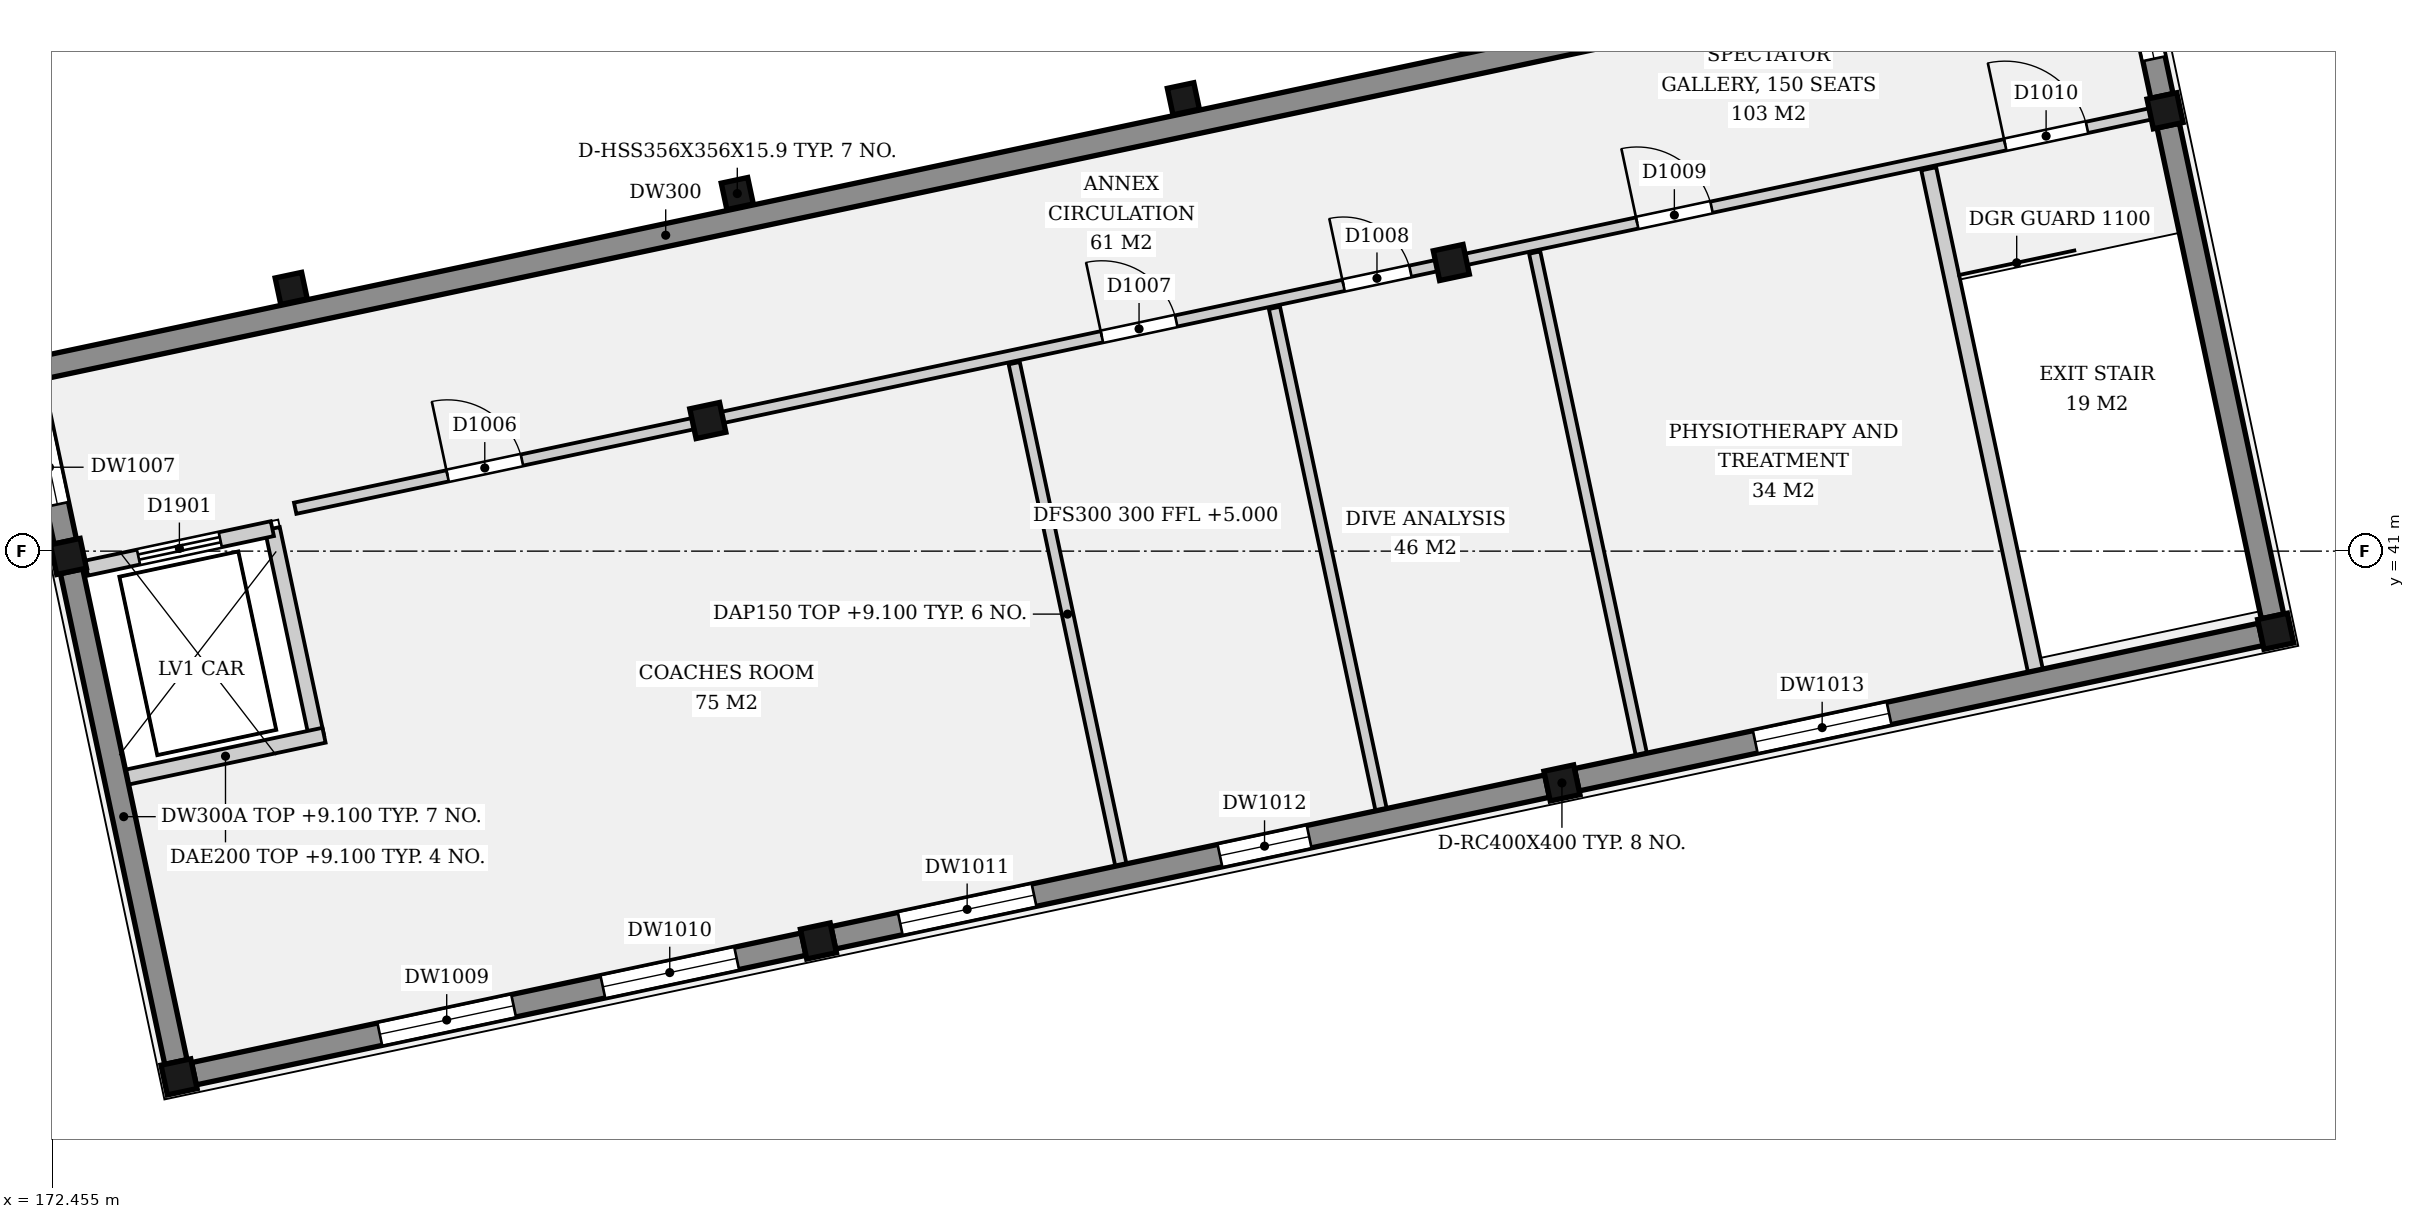
"""IFC4 building model, lengths in metres.
Left out: names, types, materials, properties, quantities, classifications, styles, units other than length and angle.
Written with IfcOpenShell. Run it as: python <this file> out.ifc"""

import sys

from ifc_helpers import new_model, si_unit, direction, frame, frame_2d, origin, origin_2d, place, context, subcontext, project, spatial, rectangle, hollow_rectangle, extrude, element, fill, save


model = new_model("IFC4")
c1 = context("Model", 3, precision=1e-05, world=origin(), true_north=direction((0.0, 1.0)))
c2 = subcontext(c1, "Body", "Model", "MODEL_VIEW")
j1 = project(units=[si_unit("LENGTHUNIT", "METRE"), si_unit("PLANEANGLEUNIT", "RADIAN")], contexts=[c1])
p1 = place(None, origin())
s1 = spatial("IfcSite", under=j1, at=p1, CompositionType="ELEMENT")
p2 = place(p1, origin())
s2 = spatial("IfcBuilding", under=s1, at=p2, CompositionType="ELEMENT")
p3 = place(p2, frame((0.0, 0.0, 5.0)))
s3 = spatial("IfcBuildingStorey", under=s2, at=p3, CompositionType="ELEMENT", Elevation=5.0)
for number, where, z_axis, x_axis in (
    (1, (174.119, 34.083, 0.0), (0.0, 0.0, 1.0), (0.978, 0.208, 0.0)),
    (2, (172.664, 40.93, 0.0), (0.0, 0.0, 1.0), (0.978, 0.208, 0.0)),
    (3, (182.531, 35.871, 0.0), (0.0, 0.0, 1.0), (0.978, 0.208, 0.0)),
    (4, (181.076, 42.718, 0.0), (0.0, 0.0, 1.0), (0.978, 0.208, 0.0)),
    (5, (192.313, 37.95, 0.0), (0.0, 0.0, 1.0), (0.978, 0.208, 0.0)),
    (6, (190.858, 44.797, 0.0), (0.0, 0.0, 1.0), (0.978, 0.208, 0.0)),
    (7, (201.703, 39.946, 0.0), (0.0, 0.0, 1.0), (0.978, 0.208, 0.0)),
    (8, (200.248, 46.793, 0.0), (0.0, 0.0, 1.0), (0.978, 0.208, 0.0)),
):
    element("IfcColumn", number, at=place(p3, frame(where, z_axis=z_axis, x_axis=x_axis)), inside=s3, PredefinedType="COLUMN", context=c2, shape_type="SweptSolid", body=[
        extrude(rectangle(XDim=0.4, YDim=0.4, at=origin_2d()), origin(), (0.0, 0.0, 1.0), 4.4),
    ])
for number, where, z_axis, x_axis in (
    (9, (175.595, 44.457, 0.0), (0.0, 0.0, 1.0), (0.978, 0.208, 0.0)),
    (10, (181.464, 45.704, 0.0), (0.0, 0.0, 1.0), (0.978, 0.208, 0.0)),
    (11, (187.333, 46.951, 0.0), (0.0, 0.0, 1.0), (0.978, 0.208, 0.0)),
):
    element("IfcColumn", number, at=place(p3, frame(where, z_axis=z_axis, x_axis=x_axis)), inside=s3, PredefinedType="COLUMN", context=c2, shape_type="SweptSolid", body=[
        extrude(hollow_rectangle(XDim=0.356, YDim=0.356, WallThickness=0.016, InnerFilletRadius=0.008, OuterFilletRadius=0.024, at=origin_2d()), origin(), (0.0, 0.0, 1.0), 4.4),
    ])
p4 = place(p3, frame((163.439, 41.525, 0.0), z_axis=(0.0, 0.0, 1.0), x_axis=(0.978148061555, 0.207909522815, 0.0)))
e12 = element("IfcWall", 12, at=p4, inside=s3, PredefinedType="SOLIDWALL", context=c2, shape_type="SweptSolid", body=[
    extrude(rectangle(XDim=37.5, YDim=0.3, at=frame_2d((18.75, 0.0))), origin(), (0.0, 0.0, 1.0), 4.4),
])
p5 = place(p4, frame((35.2, 0.0, 0.0)))
e13 = element("IfcOpeningElement", 13, at=p5, cuts=e12, PredefinedType="OPENING", context=c2, shape_type="SweptSolid", body=[
    extrude(rectangle(XDim=1.2, YDim=2.1, at=frame_2d((0.6, 1.05))), frame((0.0, 0.16, 0.0), z_axis=(0.0, -1.0, 0.0), x_axis=(1.0, 0.0, 0.0)), (0.0, 0.0, 1.0), 0.32),
])
p6 = place(p3, frame((174.315, 34.125, 0.0), z_axis=(0.0, 0.0, 1.0), x_axis=(0.978148331689, 0.207908251916, 0.0)))
e14 = element("IfcWall", 14, at=p6, inside=s3, PredefinedType="ELEMENTEDWALL", context=c2, shape_type="SweptSolid", body=[
    extrude(rectangle(XDim=8.2, YDim=0.3, at=frame_2d((4.1, 0.0))), origin(), (0.0, 0.0, 1.0), 4.1),
])
p7 = place(p6, frame((2.5, 0.0, 1.0)))
e15 = element("IfcOpeningElement", 15, at=p7, cuts=e14, PredefinedType="OPENING", context=c2, shape_type="SweptSolid", body=[
    extrude(rectangle(XDim=1.8, YDim=1.2, at=frame_2d((0.9, 0.6))), frame((0.0, 0.16, 0.0), z_axis=(0.0, -1.0, 0.0), x_axis=(1.0, 0.0, 0.0)), (0.0, 0.0, 1.0), 0.32),
])
p8 = place(p6, frame((5.5, 0.0, 1.0)))
e16 = element("IfcOpeningElement", 16, at=p8, cuts=e14, PredefinedType="OPENING", context=c2, shape_type="SweptSolid", body=[
    extrude(rectangle(XDim=1.8, YDim=1.2, at=frame_2d((0.9, 0.6))), frame((0.0, 0.16, 0.0), z_axis=(0.0, -1.0, 0.0), x_axis=(1.0, 0.0, 0.0)), (0.0, 0.0, 1.0), 0.32),
])
p9 = place(p3, frame((182.727, 35.913, 0.0), z_axis=(0.0, 0.0, 1.0), x_axis=(0.978150512552, 0.207897991319, 0.0)))
e17 = element("IfcWall", 17, at=p9, inside=s3, PredefinedType="ELEMENTEDWALL", context=c2, shape_type="SweptSolid", body=[
    extrude(rectangle(XDim=9.6, YDim=0.3, at=frame_2d((4.8, 0.0))), origin(), (0.0, 0.0, 1.0), 4.1),
])
p10 = place(p9, frame((0.9, 0.0, 1.0)))
e18 = element("IfcOpeningElement", 18, at=p10, cuts=e17, PredefinedType="OPENING", context=c2, shape_type="SweptSolid", body=[
    extrude(rectangle(XDim=1.8, YDim=1.2, at=frame_2d((0.9, 0.6))), frame((0.0, 0.16, 0.0), z_axis=(0.0, -1.0, 0.0), x_axis=(1.0, 0.0, 0.0)), (0.0, 0.0, 1.0), 0.32),
])
p11 = place(p9, frame((5.2, 0.0, 1.4)))
e19 = element("IfcOpeningElement", 19, at=p11, cuts=e17, PredefinedType="OPENING", context=c2, shape_type="SweptSolid", body=[
    extrude(rectangle(XDim=1.2, YDim=1.2, at=frame_2d((0.6, 0.6))), frame((0.0, 0.16, 0.0), z_axis=(0.0, -1.0, 0.0), x_axis=(1.0, 0.0, 0.0)), (0.0, 0.0, 1.0), 0.32),
])
p12 = place(p3, frame((192.509, 37.992, 0.0), z_axis=(0.0, 0.0, 1.0), x_axis=(0.978146709523, 0.20791588359, 0.0)))
e20 = element("IfcWall", 20, at=p12, inside=s3, PredefinedType="ELEMENTEDWALL", context=c2, shape_type="SweptSolid", body=[
    extrude(rectangle(XDim=9.2, YDim=0.3, at=frame_2d((4.6, 0.0))), origin(), (0.0, 0.0, 1.0), 4.1),
])
p13 = place(p12, frame((2.4, 0.0, 1.0)))
e21 = element("IfcOpeningElement", 21, at=p13, cuts=e20, PredefinedType="OPENING", context=c2, shape_type="SweptSolid", body=[
    extrude(rectangle(XDim=1.8, YDim=1.2, at=frame_2d((0.9, 0.6))), frame((0.0, 0.16, 0.0), z_axis=(0.0, -1.0, 0.0), x_axis=(1.0, 0.0, 0.0)), (0.0, 0.0, 1.0), 0.32),
])
for number, where, z_axis, x_axis in (
    (22, (174.078, 34.279, 0.0), (0.0, 0.0, 1.0), (-0.208, 0.978, 0.0)),
    (23, (201.662, 40.142, 0.0), (0.0, 0.0, 1.0), (-0.208, 0.978, 0.0)),
):
    element("IfcWall", number, at=place(p3, frame(where, z_axis=z_axis, x_axis=x_axis)), inside=s3, PredefinedType="ELEMENTEDWALL", context=c2, shape_type="SweptSolid", body=[
        extrude(rectangle(XDim=6.6, YDim=0.3, at=frame_2d((3.3, 0.0))), origin(), (0.0, 0.0, 1.0), 4.1),
    ])
p14 = place(p3, frame((172.623, 41.126, 0.0), z_axis=(0.0, 0.0, 1.0), x_axis=(-0.207915795165, 0.978146728319, 0.0)))
e24 = element("IfcWall", 24, at=p14, inside=s3, PredefinedType="ELEMENTEDWALL", context=c2, shape_type="SweptSolid", body=[
    extrude(rectangle(XDim=2.15, YDim=0.3, at=frame_2d((1.075, 0.0))), origin(), (0.0, 0.0, 1.0), 4.1),
])
p15 = place(p14, frame((0.5, 0.0, 1.0)))
e25 = element("IfcOpeningElement", 25, at=p15, cuts=e24, PredefinedType="OPENING", context=c2, shape_type="SweptSolid", body=[
    extrude(rectangle(XDim=1.0, YDim=1.2, at=frame_2d((0.5, 0.6))), frame((0.0, 0.16, 0.0), z_axis=(0.0, -1.0, 0.0), x_axis=(1.0, 0.0, 0.0)), (0.0, 0.0, 1.0), 0.32),
])
p16 = place(p3, frame((200.206, 46.989, 0.0), z_axis=(0.0, 0.0, 1.0), x_axis=(-0.207938891219, 0.978141818715, 0.0)))
e26 = element("IfcWall", 26, at=p16, inside=s3, PredefinedType="ELEMENTEDWALL", context=c2, shape_type="SweptSolid", body=[
    extrude(rectangle(XDim=2.15, YDim=0.3, at=frame_2d((1.075, 0.0))), origin(), (0.0, 0.0, 1.0), 4.1),
])
p17 = place(p16, frame((0.5, 0.0, 1.0)))
e27 = element("IfcOpeningElement", 27, at=p17, cuts=e26, PredefinedType="OPENING", context=c2, shape_type="SweptSolid", body=[
    extrude(rectangle(XDim=1.0, YDim=1.2, at=frame_2d((0.5, 0.6))), frame((0.0, 0.16, 0.0), z_axis=(0.0, -1.0, 0.0), x_axis=(1.0, 0.0, 0.0)), (0.0, 0.0, 1.0), 0.32),
])
p18 = place(p3, frame((175.647, 41.564, 0.0), z_axis=(0.0, 0.0, 1.0), x_axis=(0.978148991832, 0.207905146106, 0.0)))
e28 = element("IfcWall", 28, at=p18, inside=s3, PredefinedType="PARTITIONING", context=c2, shape_type="SweptSolid", body=[
    extrude(rectangle(XDim=5.35, YDim=0.15, at=frame_2d((2.675, 0.0))), origin(), (0.0, 0.0, 1.0), 4.1),
])
p19 = place(p18, frame((2.05, 0.0, 0.0)))
e29 = element("IfcOpeningElement", 29, at=p19, cuts=e28, PredefinedType="OPENING", context=c2, shape_type="SweptSolid", body=[
    extrude(rectangle(XDim=1.0, YDim=2.1, at=frame_2d((0.5, 1.05))), frame((0.0, 0.085, 0.0), z_axis=(0.0, -1.0, 0.0), x_axis=(1.0, 0.0, 0.0)), (0.0, 0.0, 1.0), 0.17),
])
p20 = place(p3, frame((181.272, 42.76, 0.0), z_axis=(0.0, 0.0, 1.0), x_axis=(0.978150512552, 0.207897991319, 0.0)))
e30 = element("IfcWall", 30, at=p20, inside=s3, PredefinedType="PARTITIONING", context=c2, shape_type="SweptSolid", body=[
    extrude(rectangle(XDim=9.6, YDim=0.15, at=frame_2d((4.8, 0.0))), origin(), (0.0, 0.0, 1.0), 4.1),
])
p21 = place(p20, frame((5.1, 0.0, 0.0)))
e31 = element("IfcOpeningElement", 31, at=p21, cuts=e30, PredefinedType="OPENING", context=c2, shape_type="SweptSolid", body=[
    extrude(rectangle(XDim=1.0, YDim=2.1, at=frame_2d((0.5, 1.05))), frame((0.0, 0.085, 0.0), z_axis=(0.0, -1.0, 0.0), x_axis=(1.0, 0.0, 0.0)), (0.0, 0.0, 1.0), 0.17),
])
p22 = place(p20, frame((8.35, 0.0, 0.0)))
e32 = element("IfcOpeningElement", 32, at=p22, cuts=e30, PredefinedType="OPENING", context=c2, shape_type="SweptSolid", body=[
    extrude(rectangle(XDim=0.9, YDim=2.1, at=frame_2d((0.45, 1.05))), frame((0.0, 0.085, 0.0), z_axis=(0.0, -1.0, 0.0), x_axis=(1.0, 0.0, 0.0)), (0.0, 0.0, 1.0), 0.17),
])
p23 = place(p3, frame((191.053, 44.839, 0.0), z_axis=(0.0, 0.0, 1.0), x_axis=(0.978146709523, 0.20791588359, 0.0)))
e33 = element("IfcWall", 33, at=p23, inside=s3, PredefinedType="PARTITIONING", context=c2, shape_type="SweptSolid", body=[
    extrude(rectangle(XDim=9.2, YDim=0.15, at=frame_2d((4.6, 0.0))), origin(), (0.0, 0.0, 1.0), 4.1),
])
p24 = place(p23, frame((2.3, 0.0, 0.0)))
e34 = element("IfcOpeningElement", 34, at=p24, cuts=e33, PredefinedType="OPENING", context=c2, shape_type="SweptSolid", body=[
    extrude(rectangle(XDim=1.0, YDim=2.1, at=frame_2d((0.5, 1.05))), frame((0.0, 0.085, 0.0), z_axis=(0.0, -1.0, 0.0), x_axis=(1.0, 0.0, 0.0)), (0.0, 0.0, 1.0), 0.17),
])
p25 = place(p23, frame((7.25, 0.0, 0.0)))
e35 = element("IfcOpeningElement", 35, at=p25, cuts=e33, PredefinedType="OPENING", context=c2, shape_type="SweptSolid", body=[
    extrude(rectangle(XDim=1.1, YDim=2.1, at=frame_2d((0.55, 1.05))), frame((0.0, 0.085, 0.0), z_axis=(0.0, -1.0, 0.0), x_axis=(1.0, 0.0, 0.0)), (0.0, 0.0, 1.0), 0.17),
])
for number, where, z_axis, x_axis in (
    (36, (186.511, 36.87, 0.0), (0.0, 0.0, 1.0), (-0.208, 0.978, 0.0)),
    (37, (189.934, 37.598, 0.0), (0.0, 0.0, 1.0), (-0.208, 0.978, 0.0)),
    (38, (193.358, 38.326, 0.0), (0.0, 0.0, 1.0), (-0.208, 0.978, 0.0)),
):
    element("IfcWall", number, at=place(p3, frame(where, z_axis=z_axis, x_axis=x_axis)), inside=s3, PredefinedType="PARTITIONING", context=c2, shape_type="SweptSolid", body=[
        extrude(rectangle(XDim=6.75, YDim=0.15, at=frame_2d((3.375, 0.0))), origin(), (0.0, 0.0, 1.0), 4.1),
    ])
p26 = place(p3, frame((172.901, 40.776, 0.0), z_axis=(0.0, 0.0, 1.0), x_axis=(0.978146935828, 0.207914818928, 0.0)))
e39 = element("IfcWall", 39, at=p26, inside=s3, PredefinedType="SOLIDWALL", context=c2, shape_type="SweptSolid", body=[
    extrude(rectangle(XDim=2.5, YDim=0.2, at=frame_2d((1.25, 0.0))), origin(), (0.0, 0.0, 1.0), 4.1),
])
p27 = place(p26, frame((0.7, 0.0, 0.0)))
e40 = element("IfcOpeningElement", 40, at=p27, cuts=e39, PredefinedType="OPENING", context=c2, shape_type="SweptSolid", body=[
    extrude(rectangle(XDim=1.1, YDim=2.1, at=frame_2d((0.55, 1.05))), frame((0.0, 0.11, 0.0), z_axis=(0.0, -1.0, 0.0), x_axis=(1.0, 0.0, 0.0)), (0.0, 0.0, 1.0), 0.22),
])
p28 = place(p3, frame((175.929, 38.557, 0.0), z_axis=(0.0, 0.0, 1.0), x_axis=(-0.207873355681, 0.978155748334, 0.0)))
e41 = element("IfcWall", 41, at=p28, inside=s3, PredefinedType="SOLIDWALL", context=c2, shape_type="SweptSolid", body=[
    extrude(rectangle(XDim=2.8, YDim=0.2, at=frame_2d((1.4, 0.0))), origin(), (0.0, 0.0, 1.0), 4.1),
])
p29 = place(p3, frame((173.435, 38.027, 0.0), z_axis=(0.0, 0.0, 1.0), x_axis=(0.978142223379, 0.207936987677, 0.0)))
e42 = element("IfcWall", 42, at=p29, inside=s3, PredefinedType="SOLIDWALL", context=c2, shape_type="SweptSolid", body=[
    extrude(rectangle(XDim=2.65, YDim=0.2, at=frame_2d((1.325, 0.0))), origin(), (0.0, 0.0, 1.0), 4.1),
])
p30 = place(p3, frame((198.542, 39.428, 0.0), z_axis=(0.0, 0.0, 1.0), x_axis=(-0.207940514438, 0.97814147364, 0.0)))
e43 = element("IfcWall", 43, at=p30, inside=s3, PredefinedType="SOLIDWALL", context=c2, shape_type="SweptSolid", body=[
    extrude(rectangle(XDim=6.75, YDim=0.2, at=frame_2d((3.375, 0.0))), origin(), (0.0, 0.0, 1.0), 4.1),
])
p31 = place(p27, origin())
e44 = element("IfcDoor", 44, at=p31, inside=s3, OperationType="SLIDING_TO_LEFT", PredefinedType="DOOR", context=c2, shape_type="SweptSolid", body=[
    extrude(rectangle(XDim=1.1, YDim=2.1, at=frame_2d((0.55, 1.05))), frame((0.0, 0.025, 0.0), z_axis=(0.0, -1.0, 0.0), x_axis=(1.0, 0.0, 0.0)), (0.0, 0.0, 1.0), 0.05),
])
fill(e40, e44)
p32 = place(p19, origin())
e45 = element("IfcDoor", 45, at=p32, inside=s3, OperationType="SINGLE_SWING_LEFT", PredefinedType="DOOR", context=c2, shape_type="SweptSolid", body=[
    extrude(rectangle(XDim=1.0, YDim=2.1, at=frame_2d((0.5, 1.05))), frame((0.0, 0.025, 0.0), z_axis=(0.0, -1.0, 0.0), x_axis=(1.0, 0.0, 0.0)), (0.0, 0.0, 1.0), 0.05),
])
fill(e29, e45)
p33 = place(p21, origin())
e46 = element("IfcDoor", 46, at=p33, inside=s3, OperationType="SINGLE_SWING_LEFT", PredefinedType="DOOR", context=c2, shape_type="SweptSolid", body=[
    extrude(rectangle(XDim=1.0, YDim=2.1, at=frame_2d((0.5, 1.05))), frame((0.0, 0.025, 0.0), z_axis=(0.0, -1.0, 0.0), x_axis=(1.0, 0.0, 0.0)), (0.0, 0.0, 1.0), 0.05),
])
fill(e31, e46)
p34 = place(p22, origin())
e47 = element("IfcDoor", 47, at=p34, inside=s3, OperationType="SINGLE_SWING_LEFT", PredefinedType="DOOR", context=c2, shape_type="SweptSolid", body=[
    extrude(rectangle(XDim=0.9, YDim=2.1, at=frame_2d((0.45, 1.05))), frame((0.0, 0.025, 0.0), z_axis=(0.0, -1.0, 0.0), x_axis=(1.0, 0.0, 0.0)), (0.0, 0.0, 1.0), 0.05),
])
fill(e32, e47)
p35 = place(p24, origin())
e48 = element("IfcDoor", 48, at=p35, inside=s3, OperationType="SINGLE_SWING_LEFT", PredefinedType="DOOR", context=c2, shape_type="SweptSolid", body=[
    extrude(rectangle(XDim=1.0, YDim=2.1, at=frame_2d((0.5, 1.05))), frame((0.0, 0.025, 0.0), z_axis=(0.0, -1.0, 0.0), x_axis=(1.0, 0.0, 0.0)), (0.0, 0.0, 1.0), 0.05),
])
fill(e34, e48)
p36 = place(p25, origin())
e49 = element("IfcDoor", 49, at=p36, inside=s3, OperationType="SINGLE_SWING_LEFT", PredefinedType="DOOR", context=c2, shape_type="SweptSolid", body=[
    extrude(rectangle(XDim=1.1, YDim=2.1, at=frame_2d((0.55, 1.05))), frame((0.0, 0.025, 0.0), z_axis=(0.0, -1.0, 0.0), x_axis=(1.0, 0.0, 0.0)), (0.0, 0.0, 1.0), 0.05),
])
fill(e35, e49)
p37 = place(p15, origin())
e50 = element("IfcWindow", 50, at=p37, inside=s3, PartitioningType="SINGLE_PANEL", PredefinedType="WINDOW", context=c2, shape_type="SweptSolid", body=[
    extrude(rectangle(XDim=1.0, YDim=1.2, at=frame_2d((0.5, 0.6))), frame((0.0, 0.03, 0.0), z_axis=(0.0, -1.0, 0.0), x_axis=(1.0, 0.0, 0.0)), (0.0, 0.0, 1.0), 0.06),
])
fill(e25, e50)
p38 = place(p17, origin())
e51 = element("IfcWindow", 51, at=p38, inside=s3, PartitioningType="SINGLE_PANEL", PredefinedType="WINDOW", context=c2, shape_type="SweptSolid", body=[
    extrude(rectangle(XDim=1.0, YDim=1.2, at=frame_2d((0.5, 0.6))), frame((0.0, 0.03, 0.0), z_axis=(0.0, -1.0, 0.0), x_axis=(1.0, 0.0, 0.0)), (0.0, 0.0, 1.0), 0.06),
])
fill(e27, e51)
p39 = place(p7, origin())
e52 = element("IfcWindow", 52, at=p39, inside=s3, PartitioningType="SINGLE_PANEL", PredefinedType="WINDOW", context=c2, shape_type="SweptSolid", body=[
    extrude(rectangle(XDim=1.8, YDim=1.2, at=frame_2d((0.9, 0.6))), frame((0.0, 0.03, 0.0), z_axis=(0.0, -1.0, 0.0), x_axis=(1.0, 0.0, 0.0)), (0.0, 0.0, 1.0), 0.06),
])
fill(e15, e52)
p40 = place(p8, origin())
e53 = element("IfcWindow", 53, at=p40, inside=s3, PartitioningType="SINGLE_PANEL", PredefinedType="WINDOW", context=c2, shape_type="SweptSolid", body=[
    extrude(rectangle(XDim=1.8, YDim=1.2, at=frame_2d((0.9, 0.6))), frame((0.0, 0.03, 0.0), z_axis=(0.0, -1.0, 0.0), x_axis=(1.0, 0.0, 0.0)), (0.0, 0.0, 1.0), 0.06),
])
fill(e16, e53)
p41 = place(p10, origin())
e54 = element("IfcWindow", 54, at=p41, inside=s3, PartitioningType="SINGLE_PANEL", PredefinedType="WINDOW", context=c2, shape_type="SweptSolid", body=[
    extrude(rectangle(XDim=1.8, YDim=1.2, at=frame_2d((0.9, 0.6))), frame((0.0, 0.03, 0.0), z_axis=(0.0, -1.0, 0.0), x_axis=(1.0, 0.0, 0.0)), (0.0, 0.0, 1.0), 0.06),
])
fill(e18, e54)
p42 = place(p11, origin())
e55 = element("IfcWindow", 55, at=p42, inside=s3, PartitioningType="SINGLE_PANEL", PredefinedType="WINDOW", context=c2, shape_type="SweptSolid", body=[
    extrude(rectangle(XDim=1.2, YDim=1.2, at=frame_2d((0.6, 0.6))), frame((0.0, 0.03, 0.0), z_axis=(0.0, -1.0, 0.0), x_axis=(1.0, 0.0, 0.0)), (0.0, 0.0, 1.0), 0.06),
])
fill(e19, e55)
p43 = place(p13, origin())
e56 = element("IfcWindow", 56, at=p43, inside=s3, PartitioningType="SINGLE_PANEL", PredefinedType="WINDOW", context=c2, shape_type="SweptSolid", body=[
    extrude(rectangle(XDim=1.8, YDim=1.2, at=frame_2d((0.9, 0.6))), frame((0.0, 0.03, 0.0), z_axis=(0.0, -1.0, 0.0), x_axis=(1.0, 0.0, 0.0)), (0.0, 0.0, 1.0), 0.06),
])
fill(e21, e56)
save(model, sys.argv[1])
